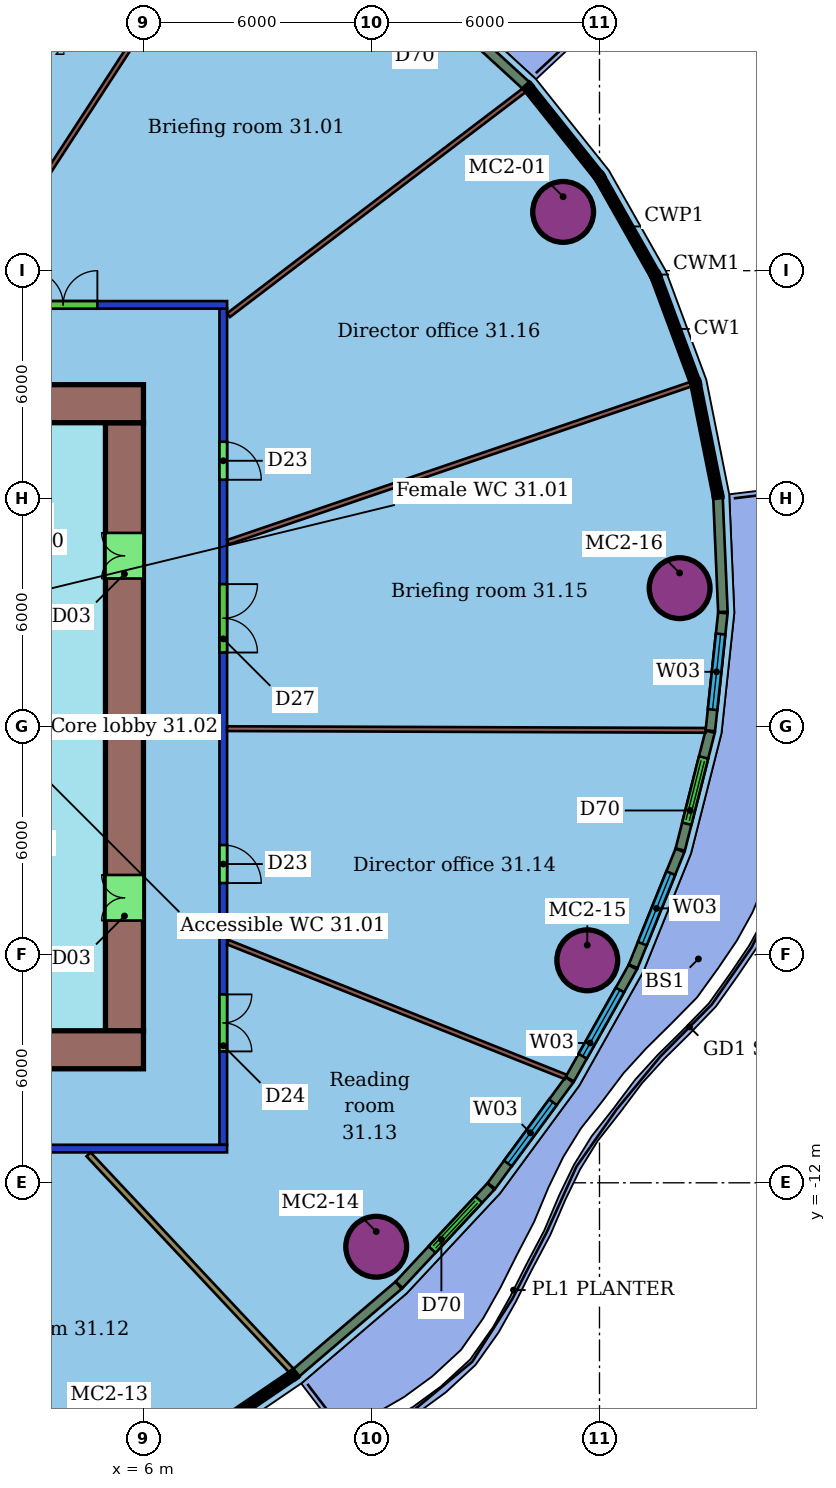
"""IFC4 building model, lengths in metres.
Left out: names, types, materials, properties, quantities, classifications, styles, units other than length and angle.
Written with IfcOpenShell. Run it as: python <this file> out.ifc"""

import sys

from ifc_helpers import new_model, si_unit, direction, frame, frame_2d, origin, origin_2d, place, context, subcontext, project, spatial, rectangle, hollow_circle, extrude, element, fill, save


model = new_model("IFC4")
c1 = context("Model", 3, precision=1e-05, world=origin(), true_north=direction((0.0, 1.0)))
c2 = subcontext(c1, "Body", "Model", "MODEL_VIEW")
j1 = project(units=[si_unit("LENGTHUNIT", "METRE"), si_unit("PLANEANGLEUNIT", "RADIAN")], contexts=[c1])
p1 = place(None, origin())
s1 = spatial("IfcSite", under=j1, at=p1, CompositionType="ELEMENT")
p2 = place(p1, origin())
s2 = spatial("IfcBuilding", under=s1, at=p2, CompositionType="ELEMENT")
p3 = place(p2, frame((0.0, 0.0, 131.8)))
s3 = spatial("IfcBuildingStorey", under=s2, at=p3, CompositionType="ELEMENT", Elevation=131.8)
for number, where, z_axis, x_axis in (
    (1, (17.043, 13.547, 0.0), (0.0, 0.0, 1.0), (1.0, 0.0, 0.0)),
    (2, (12.125, -13.683, 0.0), (0.0, 0.0, 1.0), (1.0, 0.0, 0.0)),
    (3, (17.679, -6.146, 0.0), (0.0, 0.0, 1.0), (1.0, 0.0, 0.0)),
    (4, (20.109, 3.646, 0.0), (0.0, 0.0, 1.0), (1.0, 0.0, 0.0)),
):
    element("IfcColumn", number, at=place(p3, frame(where, z_axis=z_axis, x_axis=x_axis)), inside=s3, PredefinedType="COLUMN", context=c2, shape_type="SweptSolid", body=[
        extrude(hollow_circle(Radius=0.8, WallThickness=0.055, at=origin_2d()), origin(), (0.0, 0.0, 1.0), 3.4),
    ])
p4 = place(p3, frame((8.2, -11.1, 0.0), z_axis=(0.0, 0.0, 1.0), x_axis=(-1.0, 0.0, 0.0)))
e5 = element("IfcWall", 5, at=p4, inside=s3, PredefinedType="PARTITIONING", context=c2, shape_type="SweptSolid", body=[
    extrude(rectangle(XDim=28.4, YDim=0.2, at=frame_2d((14.2, 0.0))), origin(), (0.0, 0.0, 1.0), 2.95),
])
p5 = place(p4, frame((23.462, 0.0, 0.0)))
e6 = element("IfcOpeningElement", 6, at=p5, cuts=e5, PredefinedType="OPENING", context=c2, shape_type="SweptSolid", body=[
    extrude(rectangle(XDim=0.9, YDim=2.1, at=frame_2d((0.45, 1.05))), frame((0.0, 0.11, 0.0), z_axis=(0.0, -1.0, 0.0), x_axis=(1.0, 0.0, 0.0)), (0.0, 0.0, 1.0), 0.22),
])
p6 = place(p4, frame((19.118, 0.0, 0.0)))
e7 = element("IfcOpeningElement", 7, at=p6, cuts=e5, PredefinedType="OPENING", context=c2, shape_type="SweptSolid", body=[
    extrude(rectangle(XDim=0.9, YDim=2.1, at=frame_2d((0.45, 1.05))), frame((0.0, 0.11, 0.0), z_axis=(0.0, -1.0, 0.0), x_axis=(1.0, 0.0, 0.0)), (0.0, 0.0, 1.0), 0.22),
])
p7 = place(p4, frame((12.5, 0.0, 0.0)))
e8 = element("IfcOpeningElement", 8, at=p7, cuts=e5, PredefinedType="OPENING", context=c2, shape_type="SweptSolid", body=[
    extrude(rectangle(XDim=0.9, YDim=2.1, at=frame_2d((0.45, 1.05))), frame((0.0, 0.11, 0.0), z_axis=(0.0, -1.0, 0.0), x_axis=(1.0, 0.0, 0.0)), (0.0, 0.0, 1.0), 0.22),
])
p8 = place(p4, frame((8.033, 0.0, 0.0)))
e9 = element("IfcOpeningElement", 9, at=p8, cuts=e5, PredefinedType="OPENING", context=c2, shape_type="SweptSolid", body=[
    extrude(rectangle(XDim=0.9, YDim=2.1, at=frame_2d((0.45, 1.05))), frame((0.0, 0.11, 0.0), z_axis=(0.0, -1.0, 0.0), x_axis=(1.0, 0.0, 0.0)), (0.0, 0.0, 1.0), 0.22),
])
p9 = place(p3, frame((-20.2, 11.1, 0.0), z_axis=(0.0, 0.0, 1.0), x_axis=(1.0, 0.0, 0.0)))
e10 = element("IfcWall", 10, at=p9, inside=s3, PredefinedType="PARTITIONING", context=c2, shape_type="SweptSolid", body=[
    extrude(rectangle(XDim=28.4, YDim=0.2, at=frame_2d((14.2, 0.0))), origin(), (0.0, 0.0, 1.0), 2.95),
])
p10 = place(p9, frame((23.187, 0.0, 0.0)))
e11 = element("IfcOpeningElement", 11, at=p10, cuts=e10, PredefinedType="OPENING", context=c2, shape_type="SweptSolid", body=[
    extrude(rectangle(XDim=1.8, YDim=2.4, at=frame_2d((0.9, 1.2))), frame((0.0, 0.11, 0.0), z_axis=(0.0, -1.0, 0.0), x_axis=(1.0, 0.0, 0.0)), (0.0, 0.0, 1.0), 0.22),
])
p11 = place(p9, frame((19.052, 0.0, 0.0)))
e12 = element("IfcOpeningElement", 12, at=p11, cuts=e10, PredefinedType="OPENING", context=c2, shape_type="SweptSolid", body=[
    extrude(rectangle(XDim=1.0, YDim=2.4, at=frame_2d((0.5, 1.2))), frame((0.0, 0.11, 0.0), z_axis=(0.0, -1.0, 0.0), x_axis=(1.0, 0.0, 0.0)), (0.0, 0.0, 1.0), 0.22),
])
p12 = place(p9, frame((12.32, 0.0, 0.0)))
e13 = element("IfcOpeningElement", 13, at=p12, cuts=e10, PredefinedType="OPENING", context=c2, shape_type="SweptSolid", body=[
    extrude(rectangle(XDim=1.5, YDim=2.1, at=frame_2d((0.75, 1.05))), frame((0.0, 0.11, 0.0), z_axis=(0.0, -1.0, 0.0), x_axis=(1.0, 0.0, 0.0)), (0.0, 0.0, 1.0), 0.22),
])
p13 = place(p9, frame((8.033, 0.0, 0.0)))
e14 = element("IfcOpeningElement", 14, at=p13, cuts=e10, PredefinedType="OPENING", context=c2, shape_type="SweptSolid", body=[
    extrude(rectangle(XDim=0.9, YDim=2.1, at=frame_2d((0.45, 1.05))), frame((0.0, 0.11, 0.0), z_axis=(0.0, -1.0, 0.0), x_axis=(1.0, 0.0, 0.0)), (0.0, 0.0, 1.0), 0.22),
])
p14 = place(p3, frame((8.1, 11.0, 0.0), z_axis=(0.0, 0.0, 1.0), x_axis=(0.0, -1.0, 0.0)))
e15 = element("IfcWall", 15, at=p14, inside=s3, PredefinedType="PARTITIONING", context=c2, shape_type="SweptSolid", body=[
    extrude(rectangle(XDim=22.0, YDim=0.2, at=frame_2d((11.0, 0.0))), origin(), (0.0, 0.0, 1.0), 2.95),
])
p15 = place(p14, frame((18.043, 0.0, 0.0)))
e16 = element("IfcOpeningElement", 16, at=p15, cuts=e15, PredefinedType="OPENING", context=c2, shape_type="SweptSolid", body=[
    extrude(rectangle(XDim=1.5, YDim=2.1, at=frame_2d((0.75, 1.05))), frame((0.0, 0.11, 0.0), z_axis=(0.0, -1.0, 0.0), x_axis=(1.0, 0.0, 0.0)), (0.0, 0.0, 1.0), 0.22),
])
p16 = place(p14, frame((14.113, 0.0, 0.0)))
e17 = element("IfcOpeningElement", 17, at=p16, cuts=e15, PredefinedType="OPENING", context=c2, shape_type="SweptSolid", body=[
    extrude(rectangle(XDim=1.0, YDim=2.4, at=frame_2d((0.5, 1.2))), frame((0.0, 0.11, 0.0), z_axis=(0.0, -1.0, 0.0), x_axis=(1.0, 0.0, 0.0)), (0.0, 0.0, 1.0), 0.22),
])
p17 = place(p14, frame((7.247, 0.0, 0.0)))
e18 = element("IfcOpeningElement", 18, at=p17, cuts=e15, PredefinedType="OPENING", context=c2, shape_type="SweptSolid", body=[
    extrude(rectangle(XDim=1.8, YDim=2.4, at=frame_2d((0.9, 1.2))), frame((0.0, 0.11, 0.0), z_axis=(0.0, -1.0, 0.0), x_axis=(1.0, 0.0, 0.0)), (0.0, 0.0, 1.0), 0.22),
])
p18 = place(p14, frame((3.502, 0.0, 0.0)))
e19 = element("IfcOpeningElement", 19, at=p18, cuts=e15, PredefinedType="OPENING", context=c2, shape_type="SweptSolid", body=[
    extrude(rectangle(XDim=1.0, YDim=2.4, at=frame_2d((0.5, 1.2))), frame((0.0, 0.11, 0.0), z_axis=(0.0, -1.0, 0.0), x_axis=(1.0, 0.0, 0.0)), (0.0, 0.0, 1.0), 0.22),
])
p19 = place(p3, frame((16.02, 16.748, 0.0), z_axis=(0.0, 0.0, 1.0), x_axis=(-0.795936459637, -0.605380171644, 0.0)))
e20 = element("IfcWall", 20, at=p19, inside=s3, PredefinedType="PARTITIONING", context=c2, shape_type="SweptSolid", body=[
    extrude(rectangle(XDim=9.777, YDim=0.125, at=frame_2d((4.888, 0.0))), origin(), (0.0, 0.0, 1.0), 3.4),
])
p20 = place(p3, frame((8.291, 21.959, 0.0), z_axis=(0.0, 0.0, 1.0), x_axis=(-0.545464395773, -0.838133994624, 0.0)))
e21 = element("IfcWall", 21, at=p20, inside=s3, PredefinedType="PARTITIONING", context=c2, shape_type="SweptSolid", body=[
    extrude(rectangle(XDim=12.796, YDim=0.125, at=frame_2d((6.398, 0.0))), origin(), (0.0, 0.0, 1.0), 3.4),
])
p21 = place(p3, frame((9.893, -16.941, 0.0), z_axis=(0.0, 0.0, 1.0), x_axis=(-0.684185696534, 0.729307844917, 0.0)))
e22 = element("IfcWall", 22, at=p21, inside=s3, PredefinedType="PARTITIONING", context=c2, shape_type="SweptSolid", body=[
    extrude(rectangle(XDim=7.802, YDim=0.15, at=frame_2d((3.901, 0.0))), origin(), (0.0, 0.0, 1.0), 3.4),
])
p22 = place(p3, frame((17.11, -9.213, 0.0), z_axis=(0.0, 0.0, 1.0), x_axis=(-0.928901976751, 0.370325691234, 0.0)))
e23 = element("IfcWall", 23, at=p22, inside=s3, PredefinedType="PARTITIONING", context=c2, shape_type="SweptSolid", body=[
    extrude(rectangle(XDim=9.567, YDim=0.125, at=frame_2d((4.784, 0.0))), origin(), (0.0, 0.0, 1.0), 3.4),
])
p23 = place(p3, frame((20.792, -0.095, 0.0), z_axis=(0.0, 0.0, 1.0), x_axis=(-0.999993705333, 0.003548139601, 0.0)))
e24 = element("IfcWall", 24, at=p23, inside=s3, PredefinedType="PARTITIONING", context=c2, shape_type="SweptSolid", body=[
    extrude(rectangle(XDim=12.592, YDim=0.125, at=frame_2d((6.296, 0.0))), origin(), (0.0, 0.0, 1.0), 3.4),
])
p24 = place(p3, frame((20.402, 9.013, 0.0), z_axis=(0.0, 0.0, 1.0), x_axis=(-0.946378852939, -0.32305892142, 0.0)))
e25 = element("IfcWall", 25, at=p24, inside=s3, PredefinedType="PARTITIONING", context=c2, shape_type="SweptSolid", body=[
    extrude(rectangle(XDim=12.872, YDim=0.125, at=frame_2d((6.436, 0.0))), origin(), (0.0, 0.0, 1.0), 3.4),
])
p25 = place(p3, frame((16.07, 16.87, 0.0), z_axis=(0.0, 0.0, 1.0), x_axis=(-0.736827064846, 0.676081264724, 0.0)))
e26 = element("IfcWall", 26, at=p25, inside=s3, PredefinedType="SOLIDWALL", context=c2, shape_type="SweptSolid", body=[
    extrude(rectangle(XDim=3.006, YDim=0.25, at=frame_2d((1.503, 0.0))), origin(), (0.0, 0.0, 1.0), 3.0),
])
p26 = place(p3, frame((10.011, -17.005, 0.0), z_axis=(0.0, 0.0, 1.0), x_axis=(0.760361656754, 0.649499923739, 0.0)))
e27 = element("IfcWall", 27, at=p26, inside=s3, PredefinedType="SOLIDWALL", context=c2, shape_type="SweptSolid", body=[
    extrude(rectangle(XDim=3.552, YDim=0.25, at=frame_2d((1.776, 0.0))), origin(), (0.0, 0.0, 1.0), 3.0),
])
p27 = place(p3, frame((12.728, -14.683, 0.0), z_axis=(0.0, 0.0, 1.0), x_axis=(0.68242890863, 0.730951971518, 0.0)))
e28 = element("IfcWall", 28, at=p27, inside=s3, PredefinedType="SOLIDWALL", context=c2, shape_type="SweptSolid", body=[
    extrude(rectangle(XDim=3.537, YDim=0.25, at=frame_2d((1.769, 0.0))), origin(), (0.0, 0.0, 1.0), 3.0),
])
p28 = place(p27, frame((1.269, 0.0, 0.0)))
e29 = element("IfcOpeningElement", 29, at=p28, cuts=e28, PredefinedType="OPENING", context=c2, shape_type="SweptSolid", body=[
    extrude(rectangle(XDim=1.8, YDim=2.4, at=frame_2d((0.9, 1.2))), frame((0.0, 0.135, 0.0), z_axis=(0.0, -1.0, 0.0), x_axis=(1.0, 0.0, 0.0)), (0.0, 0.0, 1.0), 0.27),
])
p29 = place(p3, frame((15.156, -12.08, 0.0), z_axis=(0.0, 0.0, 1.0), x_axis=(0.592551943195, 0.805532243064, 0.0)))
e30 = element("IfcWall", 30, at=p29, inside=s3, PredefinedType="SOLIDWALL", context=c2, shape_type="SweptSolid", body=[
    extrude(rectangle(XDim=3.463, YDim=0.25, at=frame_2d((1.731, 0.0))), origin(), (0.0, 0.0, 1.0), 3.0),
])
p30 = place(p29, frame((0.731, 0.0, 0.9)))
e31 = element("IfcOpeningElement", 31, at=p30, cuts=e30, PredefinedType="OPENING", context=c2, shape_type="SweptSolid", body=[
    extrude(rectangle(XDim=2.0, YDim=2.1, at=frame_2d((1.0, 1.05))), frame((0.0, 0.135, 0.0), z_axis=(0.0, -1.0, 0.0), x_axis=(1.0, 0.0, 0.0)), (0.0, 0.0, 1.0), 0.27),
])
p31 = place(p3, frame((17.221, -9.271, 0.0), z_axis=(0.0, 0.0, 1.0), x_axis=(0.489962712025, 0.871743391616, 0.0)))
e32 = element("IfcWall", 32, at=p31, inside=s3, PredefinedType="SOLIDWALL", context=c2, shape_type="SweptSolid", body=[
    extrude(rectangle(XDim=3.378, YDim=0.25, at=frame_2d((1.689, 0.0))), origin(), (0.0, 0.0, 1.0), 3.0),
])
p32 = place(p31, frame((0.689, 0.0, 0.9)))
e33 = element("IfcOpeningElement", 33, at=p32, cuts=e32, PredefinedType="OPENING", context=c2, shape_type="SweptSolid", body=[
    extrude(rectangle(XDim=2.0, YDim=2.1, at=frame_2d((1.0, 1.05))), frame((0.0, 0.135, 0.0), z_axis=(0.0, -1.0, 0.0), x_axis=(1.0, 0.0, 0.0)), (0.0, 0.0, 1.0), 0.27),
])
p33 = place(p3, frame((18.886, -6.304, 0.0), z_axis=(0.0, 0.0, 1.0), x_axis=(0.374307156661, 0.927304778631, 0.0)))
e34 = element("IfcWall", 34, at=p33, inside=s3, PredefinedType="SOLIDWALL", context=c2, shape_type="SweptSolid", body=[
    extrude(rectangle(XDim=3.289, YDim=0.25, at=frame_2d((1.644, 0.0))), origin(), (0.0, 0.0, 1.0), 3.0),
])
p34 = place(p33, frame((0.644, 0.0, 0.9)))
e35 = element("IfcOpeningElement", 35, at=p34, cuts=e34, PredefinedType="OPENING", context=c2, shape_type="SweptSolid", body=[
    extrude(rectangle(XDim=2.0, YDim=2.1, at=frame_2d((1.0, 1.05))), frame((0.0, 0.135, 0.0), z_axis=(0.0, -1.0, 0.0), x_axis=(1.0, 0.0, 0.0)), (0.0, 0.0, 1.0), 0.27),
])
p35 = place(p3, frame((20.125, -3.231, 0.0), z_axis=(0.0, 0.0, 1.0), x_axis=(0.245873914642, 0.969301819919, 0.0)))
e36 = element("IfcWall", 36, at=p35, inside=s3, PredefinedType="SOLIDWALL", context=c2, shape_type="SweptSolid", body=[
    extrude(rectangle(XDim=3.199, YDim=0.25, at=frame_2d((1.6, 0.0))), origin(), (0.0, 0.0, 1.0), 3.0),
])
p36 = place(p35, frame((0.7, 0.0, 0.0)))
e37 = element("IfcOpeningElement", 37, at=p36, cuts=e36, PredefinedType="OPENING", context=c2, shape_type="SweptSolid", body=[
    extrude(rectangle(XDim=1.8, YDim=2.4, at=frame_2d((0.9, 1.2))), frame((0.0, 0.135, 0.0), z_axis=(0.0, -1.0, 0.0), x_axis=(1.0, 0.0, 0.0)), (0.0, 0.0, 1.0), 0.27),
])
p37 = place(p3, frame((20.916, -0.104, 0.0), z_axis=(0.0, 0.0, 1.0), x_axis=(0.105985463216, 0.994367679275, 0.0)))
e38 = element("IfcWall", 38, at=p37, inside=s3, PredefinedType="SOLIDWALL", context=c2, shape_type="SweptSolid", body=[
    extrude(rectangle(XDim=3.117, YDim=0.25, at=frame_2d((1.558, 0.0))), origin(), (0.0, 0.0, 1.0), 3.0),
])
p38 = place(p37, frame((0.558, 0.0, 0.9)))
e39 = element("IfcOpeningElement", 39, at=p38, cuts=e38, PredefinedType="OPENING", context=c2, shape_type="SweptSolid", body=[
    extrude(rectangle(XDim=2.0, YDim=2.1, at=frame_2d((1.0, 1.05))), frame((0.0, 0.135, 0.0), z_axis=(0.0, -1.0, 0.0), x_axis=(1.0, 0.0, 0.0)), (0.0, 0.0, 1.0), 0.27),
])
p39 = place(p3, frame((21.247, 3.021, 0.0), z_axis=(0.0, 0.0, 1.0), x_axis=(-0.042876894393, 0.999080363098, 0.0)))
e40 = element("IfcWall", 40, at=p39, inside=s3, PredefinedType="SOLIDWALL", context=c2, shape_type="SweptSolid", body=[
    extrude(rectangle(XDim=3.006, YDim=0.25, at=frame_2d((1.503, 0.0))), origin(), (0.0, 0.0, 1.0), 3.0),
])
p40 = place(p3, frame((6.0, 8.5, 0.0), z_axis=(0.0, 0.0, 1.0), x_axis=(-1.0, 0.0, 0.0)))
e41 = element("IfcWall", 41, at=p40, inside=s3, PredefinedType="SHEAR", context=c2, shape_type="SweptSolid", body=[
    extrude(rectangle(XDim=12.0, YDim=1.0, at=frame_2d((6.0, 0.0))), origin(), (0.0, 0.0, 1.0), 3.3),
])
p41 = place(p40, frame((5.6, 0.0, 0.0)))
e42 = element("IfcOpeningElement", 42, at=p41, cuts=e41, PredefinedType="OPENING", context=c2, shape_type="SweptSolid", body=[
    extrude(rectangle(XDim=1.2, YDim=2.1, at=frame_2d((0.6, 1.05))), frame((0.0, 0.51, 0.0), z_axis=(0.0, -1.0, 0.0), x_axis=(1.0, 0.0, 0.0)), (0.0, 0.0, 1.0), 1.02),
])
p42 = place(p3, frame((-18.0, -8.5, 0.0), z_axis=(0.0, 0.0, 1.0), x_axis=(1.0, 0.0, 0.0)))
e43 = element("IfcWall", 43, at=p42, inside=s3, PredefinedType="SHEAR", context=c2, shape_type="SweptSolid", body=[
    extrude(rectangle(XDim=24.0, YDim=1.0, at=frame_2d((12.0, 0.0))), origin(), (0.0, 0.0, 1.0), 3.3),
])
p43 = place(p42, frame((6.0, 0.0, 0.0)))
e44 = element("IfcOpeningElement", 44, at=p43, cuts=e43, PredefinedType="OPENING", context=c2, shape_type="SweptSolid", body=[
    extrude(rectangle(XDim=1.2, YDim=2.1, at=frame_2d((0.6, 1.05))), frame((0.0, 0.51, 0.0), z_axis=(0.0, -1.0, 0.0), x_axis=(1.0, 0.0, 0.0)), (0.0, 0.0, 1.0), 1.02),
])
p44 = place(p3, frame((5.5, -8.0, 0.0), z_axis=(0.0, 0.0, 1.0), x_axis=(0.0, 1.0, 0.0)))
e45 = element("IfcWall", 45, at=p44, inside=s3, PredefinedType="SHEAR", context=c2, shape_type="SweptSolid", body=[
    extrude(rectangle(XDim=16.0, YDim=1.0, at=frame_2d((8.0, 0.0))), origin(), (0.0, 0.0, 1.0), 3.3),
])
p45 = place(p44, frame((2.9, 0.0, 0.0)))
e46 = element("IfcOpeningElement", 46, at=p45, cuts=e45, PredefinedType="OPENING", context=c2, shape_type="SweptSolid", body=[
    extrude(rectangle(XDim=1.2, YDim=2.1, at=frame_2d((0.6, 1.05))), frame((0.0, 0.51, 0.0), z_axis=(0.0, -1.0, 0.0), x_axis=(1.0, 0.0, 0.0)), (0.0, 0.0, 1.0), 1.02),
])
p46 = place(p44, frame((11.9, 0.0, 0.0)))
e47 = element("IfcOpeningElement", 47, at=p46, cuts=e45, PredefinedType="OPENING", context=c2, shape_type="SweptSolid", body=[
    extrude(rectangle(XDim=1.2, YDim=2.1, at=frame_2d((0.6, 1.05))), frame((0.0, 0.51, 0.0), z_axis=(0.0, -1.0, 0.0), x_axis=(1.0, 0.0, 0.0)), (0.0, 0.0, 1.0), 1.02),
])
p47 = place(p10, origin())
e48 = element("IfcDoor", 48, at=p47, inside=s3, OperationType="DOUBLE_DOOR_SINGLE_SWING", PredefinedType="DOOR", context=c2, shape_type="SweptSolid", body=[
    extrude(rectangle(XDim=1.8, YDim=2.4, at=frame_2d((0.9, 1.2))), frame((0.0, 0.025, 0.0), z_axis=(0.0, -1.0, 0.0), x_axis=(1.0, 0.0, 0.0)), (0.0, 0.0, 1.0), 0.05),
])
fill(e11, e48)
p48 = place(p15, origin())
e49 = element("IfcDoor", 49, at=p48, inside=s3, OperationType="DOUBLE_DOOR_SINGLE_SWING", PredefinedType="DOOR", context=c2, shape_type="SweptSolid", body=[
    extrude(rectangle(XDim=1.5, YDim=2.1, at=frame_2d((0.75, 1.05))), frame((0.0, 0.025, 0.0), z_axis=(0.0, -1.0, 0.0), x_axis=(1.0, 0.0, 0.0)), (0.0, 0.0, 1.0), 0.05),
])
fill(e16, e49)
p49 = place(p16, origin())
e50 = element("IfcDoor", 50, at=p49, inside=s3, OperationType="SINGLE_SWING_RIGHT", PredefinedType="DOOR", context=c2, shape_type="SweptSolid", body=[
    extrude(rectangle(XDim=1.0, YDim=2.4, at=frame_2d((0.5, 1.2))), frame((0.0, 0.025, 0.0), z_axis=(0.0, -1.0, 0.0), x_axis=(1.0, 0.0, 0.0)), (0.0, 0.0, 1.0), 0.05),
])
fill(e17, e50)
p50 = place(p17, origin())
e51 = element("IfcDoor", 51, at=p50, inside=s3, OperationType="DOUBLE_DOOR_SINGLE_SWING", PredefinedType="DOOR", context=c2, shape_type="SweptSolid", body=[
    extrude(rectangle(XDim=1.8, YDim=2.4, at=frame_2d((0.9, 1.2))), frame((0.0, 0.025, 0.0), z_axis=(0.0, -1.0, 0.0), x_axis=(1.0, 0.0, 0.0)), (0.0, 0.0, 1.0), 0.05),
])
fill(e18, e51)
p51 = place(p18, origin())
e52 = element("IfcDoor", 52, at=p51, inside=s3, OperationType="SINGLE_SWING_RIGHT", PredefinedType="DOOR", context=c2, shape_type="SweptSolid", body=[
    extrude(rectangle(XDim=1.0, YDim=2.4, at=frame_2d((0.5, 1.2))), frame((0.0, 0.025, 0.0), z_axis=(0.0, -1.0, 0.0), x_axis=(1.0, 0.0, 0.0)), (0.0, 0.0, 1.0), 0.05),
])
fill(e19, e52)
p52 = place(p28, origin())
e53 = element("IfcDoor", 53, at=p52, inside=s3, OperationType="DOUBLE_DOOR_SLIDING", PredefinedType="DOOR", context=c2, shape_type="SweptSolid", body=[
    extrude(rectangle(XDim=1.8, YDim=2.4, at=frame_2d((0.9, 1.2))), frame((0.0, 0.025, 0.0), z_axis=(0.0, -1.0, 0.0), x_axis=(1.0, 0.0, 0.0)), (0.0, 0.0, 1.0), 0.05),
])
fill(e29, e53)
p53 = place(p30, origin())
e54 = element("IfcWindow", 54, at=p53, inside=s3, PartitioningType="SINGLE_PANEL", PredefinedType="WINDOW", context=c2, shape_type="SweptSolid", body=[
    extrude(rectangle(XDim=2.0, YDim=2.1, at=frame_2d((1.0, 1.05))), frame((0.0, 0.03, 0.0), z_axis=(0.0, -1.0, 0.0), x_axis=(1.0, 0.0, 0.0)), (0.0, 0.0, 1.0), 0.06),
])
fill(e31, e54)
p54 = place(p32, origin())
e55 = element("IfcWindow", 55, at=p54, inside=s3, PartitioningType="SINGLE_PANEL", PredefinedType="WINDOW", context=c2, shape_type="SweptSolid", body=[
    extrude(rectangle(XDim=2.0, YDim=2.1, at=frame_2d((1.0, 1.05))), frame((0.0, 0.03, 0.0), z_axis=(0.0, -1.0, 0.0), x_axis=(1.0, 0.0, 0.0)), (0.0, 0.0, 1.0), 0.06),
])
fill(e33, e55)
p55 = place(p34, origin())
e56 = element("IfcWindow", 56, at=p55, inside=s3, PartitioningType="SINGLE_PANEL", PredefinedType="WINDOW", context=c2, shape_type="SweptSolid", body=[
    extrude(rectangle(XDim=2.0, YDim=2.1, at=frame_2d((1.0, 1.05))), frame((0.0, 0.03, 0.0), z_axis=(0.0, -1.0, 0.0), x_axis=(1.0, 0.0, 0.0)), (0.0, 0.0, 1.0), 0.06),
])
fill(e35, e56)
p56 = place(p36, origin())
e57 = element("IfcDoor", 57, at=p56, inside=s3, OperationType="DOUBLE_DOOR_SLIDING", PredefinedType="DOOR", context=c2, shape_type="SweptSolid", body=[
    extrude(rectangle(XDim=1.8, YDim=2.4, at=frame_2d((0.9, 1.2))), frame((0.0, 0.025, 0.0), z_axis=(0.0, -1.0, 0.0), x_axis=(1.0, 0.0, 0.0)), (0.0, 0.0, 1.0), 0.05),
])
fill(e37, e57)
p57 = place(p38, origin())
e58 = element("IfcWindow", 58, at=p57, inside=s3, PartitioningType="SINGLE_PANEL", PredefinedType="WINDOW", context=c2, shape_type="SweptSolid", body=[
    extrude(rectangle(XDim=2.0, YDim=2.1, at=frame_2d((1.0, 1.05))), frame((0.0, 0.03, 0.0), z_axis=(0.0, -1.0, 0.0), x_axis=(1.0, 0.0, 0.0)), (0.0, 0.0, 1.0), 0.06),
])
fill(e39, e58)
p58 = place(p45, origin())
e59 = element("IfcDoor", 59, at=p58, inside=s3, OperationType="DOUBLE_DOOR_SINGLE_SWING", PredefinedType="NOTDEFINED", context=c2, shape_type="SweptSolid", body=[
    extrude(rectangle(XDim=1.2, YDim=2.1, at=frame_2d((0.6, 1.05))), frame((0.0, 0.025, 0.0), z_axis=(0.0, -1.0, 0.0), x_axis=(1.0, 0.0, 0.0)), (0.0, 0.0, 1.0), 0.05),
])
fill(e46, e59)
p59 = place(p46, origin())
e60 = element("IfcDoor", 60, at=p59, inside=s3, OperationType="DOUBLE_DOOR_SINGLE_SWING", PredefinedType="NOTDEFINED", context=c2, shape_type="SweptSolid", body=[
    extrude(rectangle(XDim=1.2, YDim=2.1, at=frame_2d((0.6, 1.05))), frame((0.0, 0.025, 0.0), z_axis=(0.0, -1.0, 0.0), x_axis=(1.0, 0.0, 0.0)), (0.0, 0.0, 1.0), 0.05),
])
fill(e47, e60)
save(model, sys.argv[1])
